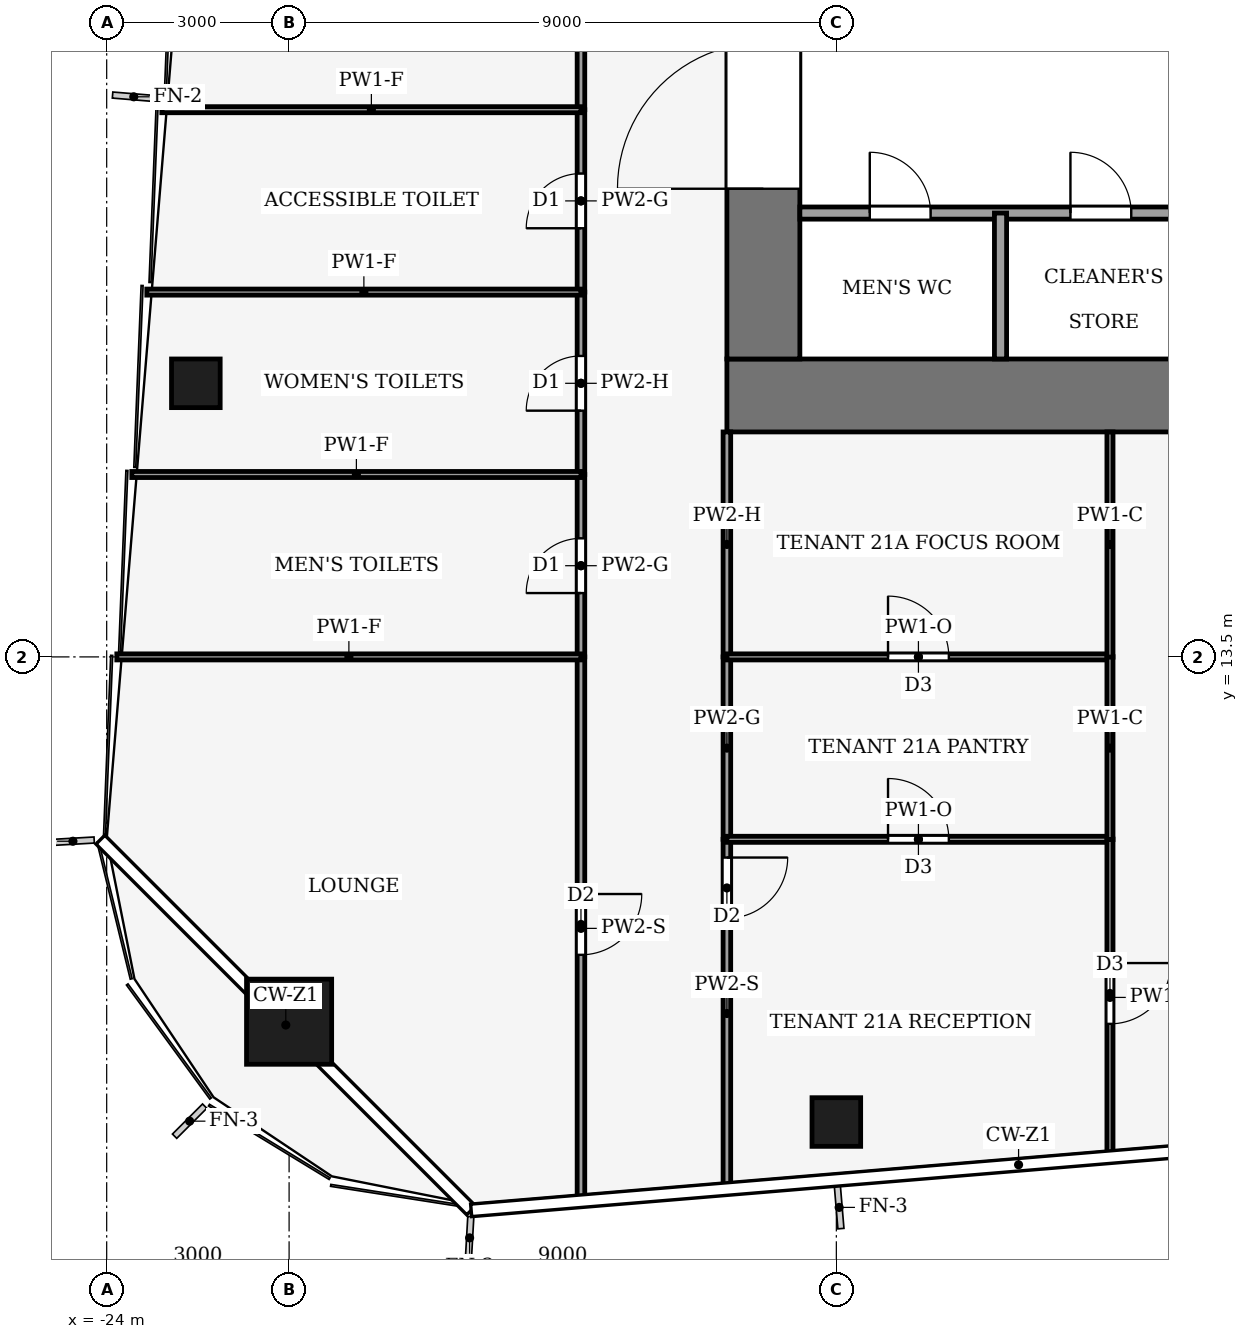
"""IFC4 building model, lengths in metres.
Left out: names, types, materials, properties, quantities, classifications, styles, units other than length and angle.
Written with IfcOpenShell. Run it as: python <this file> out.ifc"""

import sys

from ifc_helpers import new_model, si_unit, direction, frame, frame_2d, origin, origin_2d, place, context, subcontext, project, spatial, rectangle, hollow_rectangle, extrude, element, fill, save


model = new_model("IFC4")
c1 = context("Model", 3, precision=1e-05, world=origin(), true_north=direction((0.0, 1.0)))
c2 = subcontext(c1, "Body", "Model", "MODEL_VIEW")
j1 = project(units=[si_unit("LENGTHUNIT", "METRE"), si_unit("PLANEANGLEUNIT", "RADIAN")], contexts=[c1])
p1 = place(None, origin())
s1 = spatial("IfcSite", under=j1, at=p1, CompositionType="ELEMENT")
p2 = place(p1, origin())
s2 = spatial("IfcBuilding", under=s1, at=p2, CompositionType="ELEMENT")
p3 = place(p2, frame((0.0, 0.0, 94.0)))
s3 = spatial("IfcBuildingStorey", under=s2, at=p3, CompositionType="ELEMENT", Elevation=94.0)
p4 = place(p3, frame((-13.8, 17.8, -0.13), z_axis=(0.0, 0.0, 1.0), x_axis=(1.0, 0.0, 0.0)))
e1 = element("IfcWall", 1, at=p4, inside=s3, PredefinedType="SHEAR", context=c2, shape_type="SweptSolid", body=[
    extrude(rectangle(XDim=27.6, YDim=1.2, at=frame_2d((13.8, 0.0))), origin(), (0.0, 0.0, 1.0), 4.0),
])
p5 = place(p3, frame((-13.2, 18.4, -0.13), z_axis=(0.0, 0.0, 1.0), x_axis=(0.0, 1.0, 0.0)))
e2 = element("IfcWall", 2, at=p5, inside=s3, PredefinedType="SHEAR", context=c2, shape_type="SweptSolid", body=[
    extrude(rectangle(XDim=19.2, YDim=1.2, at=frame_2d((9.6, 0.0))), origin(), (0.0, 0.0, 1.0), 4.0),
])
p6 = place(p5, frame((2.8, 0.0, 0.13)))
e3 = element("IfcOpeningElement", 3, at=p6, cuts=e2, PredefinedType="OPENING", context=c2, shape_type="SweptSolid", body=[
    extrude(rectangle(XDim=2.4, YDim=2.4, at=frame_2d((1.2, 1.2))), frame((0.0, 0.61, 0.0), z_axis=(0.0, -1.0, 0.0), x_axis=(1.0, 0.0, 0.0)), (0.0, 0.0, 1.0), 1.22),
])
p7 = place(p5, frame((13.4, 0.0, 0.13)))
e4 = element("IfcOpeningElement", 4, at=p7, cuts=e2, PredefinedType="OPENING", context=c2, shape_type="SweptSolid", body=[
    extrude(rectangle(XDim=1.4, YDim=2.2, at=frame_2d((0.7, 1.1))), frame((0.0, 0.61, 0.0), z_axis=(0.0, -1.0, 0.0), x_axis=(1.0, 0.0, 0.0)), (0.0, 0.0, 1.0), 1.22),
])
p8 = place(p3, frame((-21.0, 7.5, 0.0), z_axis=(0.0, 0.0, 1.0), x_axis=(1.0, 0.0, 0.0)))
e5 = element("IfcColumn", 5, at=p8, inside=s3, PredefinedType="COLUMN", context=c2, shape_type="SweptSolid", body=[
    extrude(hollow_rectangle(XDim=1.4, YDim=1.4, WallThickness=0.08, at=origin_2d()), origin(), (0.0, 0.0, 1.0), 4.0),
])
for number, where, z_axis, x_axis in (
    (6, (-12.0, 5.85, 0.0), (0.0, 0.0, 1.0), (1.0, 0.0, 0.0)),
    (7, (-22.534, 18.0, 0.0), (0.0, 0.0, 1.0), (1.0, 0.0, 0.0)),
):
    element("IfcColumn", number, at=place(p3, frame(where, z_axis=z_axis, x_axis=x_axis)), inside=s3, PredefinedType="COLUMN", context=c2, shape_type="SweptSolid", body=[
        extrude(hollow_rectangle(XDim=0.8, YDim=0.8, WallThickness=0.04, at=origin_2d()), origin(), (0.0, 0.0, 1.0), 4.0),
    ])
p9 = place(p3, frame((-12.6, 20.8, 0.0), z_axis=(0.0, 0.0, 1.0), x_axis=(1.0, 0.0, 0.0)))
e8 = element("IfcWall", 8, at=p9, inside=s3, PredefinedType="PARTITIONING", context=c2, shape_type="SweptSolid", body=[
    extrude(rectangle(XDim=6.6, YDim=0.2, at=frame_2d((3.3, 0.0))), origin(), (0.0, 0.0, 1.0), 3.87),
])
p10 = place(p9, frame((1.15, 0.0, 0.0)))
e9 = element("IfcOpeningElement", 9, at=p10, cuts=e8, PredefinedType="OPENING", context=c2, shape_type="SweptSolid", body=[
    extrude(rectangle(XDim=1.0, YDim=2.1, at=frame_2d((0.5, 1.05))), frame((0.0, 0.11, 0.0), z_axis=(0.0, -1.0, 0.0), x_axis=(1.0, 0.0, 0.0)), (0.0, 0.0, 1.0), 0.22),
])
p11 = place(p9, frame((4.45, 0.0, 0.0)))
e10 = element("IfcOpeningElement", 10, at=p11, cuts=e8, PredefinedType="OPENING", context=c2, shape_type="SweptSolid", body=[
    extrude(rectangle(XDim=1.0, YDim=2.1, at=frame_2d((0.5, 1.05))), frame((0.0, 0.11, 0.0), z_axis=(0.0, -1.0, 0.0), x_axis=(1.0, 0.0, 0.0)), (0.0, 0.0, 1.0), 0.22),
])
p12 = place(p3, frame((-9.3, 18.4, 0.0), z_axis=(0.0, 0.0, 1.0), x_axis=(0.0, 1.0, 0.0)))
e11 = element("IfcWall", 11, at=p12, inside=s3, PredefinedType="PARTITIONING", context=c2, shape_type="SweptSolid", body=[
    extrude(rectangle(XDim=2.4, YDim=0.2, at=frame_2d((1.2, 0.0))), origin(), (0.0, 0.0, 1.0), 3.87),
])
p13 = place(p3, frame((-16.2, 13.5, 0.0), z_axis=(0.0, 0.0, 1.0), x_axis=(0.0, -1.0, 0.0)))
e12 = element("IfcWall", 12, at=p13, inside=s3, PredefinedType="PARTITIONING", context=c2, shape_type="SweptSolid", body=[
    extrude(rectangle(XDim=8.93, YDim=0.125, at=frame_2d((4.465, 0.0))), origin(), (0.0, 0.0, 1.0), 3.04),
])
p14 = place(p13, frame((3.9, 0.0, 0.0)))
e13 = element("IfcOpeningElement", 13, at=p14, cuts=e12, PredefinedType="OPENING", context=c2, shape_type="SweptSolid", body=[
    extrude(rectangle(XDim=1.0, YDim=2.1, at=frame_2d((0.5, 1.05))), frame((0.0, 0.073, 0.0), z_axis=(0.0, -1.0, 0.0), x_axis=(1.0, 0.0, 0.0)), (0.0, 0.0, 1.0), 0.145),
])
p15 = place(p3, frame((-16.2, 13.5, 0.0), z_axis=(0.0, 0.0, 1.0), x_axis=(0.0, 1.0, 0.0)))
e14 = element("IfcWall", 14, at=p15, inside=s3, PredefinedType="PARTITIONING", context=c2, shape_type="SweptSolid", body=[
    extrude(rectangle(XDim=3.0, YDim=0.125, at=frame_2d((1.5, 0.0))), origin(), (0.0, 0.0, 1.0), 3.87),
])
p16 = place(p15, frame((1.05, 0.0, 0.0)))
e15 = element("IfcOpeningElement", 15, at=p16, cuts=e14, PredefinedType="OPENING", context=c2, shape_type="SweptSolid", body=[
    extrude(rectangle(XDim=0.9, YDim=2.1, at=frame_2d((0.45, 1.05))), frame((0.0, 0.073, 0.0), z_axis=(0.0, -1.0, 0.0), x_axis=(1.0, 0.0, 0.0)), (0.0, 0.0, 1.0), 0.145),
])
p17 = place(p3, frame((-16.2, 16.5, 0.0), z_axis=(0.0, 0.0, 1.0), x_axis=(0.0, 1.0, 0.0)))
e16 = element("IfcWall", 16, at=p17, inside=s3, PredefinedType="PARTITIONING", context=c2, shape_type="SweptSolid", body=[
    extrude(rectangle(XDim=3.0, YDim=0.125, at=frame_2d((1.5, 0.0))), origin(), (0.0, 0.0, 1.0), 3.14),
])
p18 = place(p17, frame((1.05, 0.0, 0.0)))
e17 = element("IfcOpeningElement", 17, at=p18, cuts=e16, PredefinedType="OPENING", context=c2, shape_type="SweptSolid", body=[
    extrude(rectangle(XDim=0.9, YDim=2.1, at=frame_2d((0.45, 1.05))), frame((0.0, 0.073, 0.0), z_axis=(0.0, -1.0, 0.0), x_axis=(1.0, 0.0, 0.0)), (0.0, 0.0, 1.0), 0.145),
])
p19 = place(p3, frame((-16.2, 19.5, 0.0), z_axis=(0.0, 0.0, 1.0), x_axis=(0.0, 1.0, 0.0)))
e18 = element("IfcWall", 18, at=p19, inside=s3, PredefinedType="PARTITIONING", context=c2, shape_type="SweptSolid", body=[
    extrude(rectangle(XDim=3.0, YDim=0.125, at=frame_2d((1.5, 0.0))), origin(), (0.0, 0.0, 1.0), 3.87),
])
p20 = place(p19, frame((1.05, 0.0, 0.0)))
e19 = element("IfcOpeningElement", 19, at=p20, cuts=e18, PredefinedType="OPENING", context=c2, shape_type="SweptSolid", body=[
    extrude(rectangle(XDim=0.9, YDim=2.1, at=frame_2d((0.45, 1.05))), frame((0.0, 0.073, 0.0), z_axis=(0.0, -1.0, 0.0), x_axis=(1.0, 0.0, 0.0)), (0.0, 0.0, 1.0), 0.145),
])
p21 = place(p3, frame((-16.2, 22.5, 0.0), z_axis=(0.0, 0.0, 1.0), x_axis=(0.0, 1.0, 0.0)))
e20 = element("IfcWall", 20, at=p21, inside=s3, PredefinedType="PARTITIONING", context=c2, shape_type="SweptSolid", body=[
    extrude(rectangle(XDim=9.0, YDim=0.125, at=frame_2d((4.5, 0.0))), origin(), (0.0, 0.0, 1.0), 3.48),
])
p22 = place(p21, frame((4.0, 0.0, 0.0)))
e21 = element("IfcOpeningElement", 21, at=p22, cuts=e20, PredefinedType="OPENING", context=c2, shape_type="SweptSolid", body=[
    extrude(rectangle(XDim=1.0, YDim=2.1, at=frame_2d((0.5, 1.05))), frame((0.0, 0.073, 0.0), z_axis=(0.0, -1.0, 0.0), x_axis=(1.0, 0.0, 0.0)), (0.0, 0.0, 1.0), 0.145),
])
p23 = place(p3, frame((-13.8, 10.5, 0.0), z_axis=(0.0, 0.0, 1.0), x_axis=(0.0, -1.0, 0.0)))
e22 = element("IfcWall", 22, at=p23, inside=s3, PredefinedType="PARTITIONING", context=c2, shape_type="SweptSolid", body=[
    extrude(rectangle(XDim=5.73, YDim=0.125, at=frame_2d((2.865, 0.0))), origin(), (0.0, 0.0, 1.0), 3.04),
])
p24 = place(p23, frame((0.3, 0.0, 0.0)))
e23 = element("IfcOpeningElement", 23, at=p24, cuts=e22, PredefinedType="OPENING", context=c2, shape_type="SweptSolid", body=[
    extrude(rectangle(XDim=1.0, YDim=2.1, at=frame_2d((0.5, 1.05))), frame((0.0, 0.073, 0.0), z_axis=(0.0, -1.0, 0.0), x_axis=(1.0, 0.0, 0.0)), (0.0, 0.0, 1.0), 0.145),
])
p25 = place(p3, frame((-13.8, 10.5, 0.0), z_axis=(0.0, 0.0, 1.0), x_axis=(0.0, 1.0, 0.0)))
e24 = element("IfcWall", 24, at=p25, inside=s3, PredefinedType="PARTITIONING", context=c2, shape_type="SweptSolid", body=[
    extrude(rectangle(XDim=3.0, YDim=0.125, at=frame_2d((1.5, 0.0))), origin(), (0.0, 0.0, 1.0), 3.87),
])
p26 = place(p3, frame((-13.8, 13.5, 0.0), z_axis=(0.0, 0.0, 1.0), x_axis=(0.0, 1.0, 0.0)))
e25 = element("IfcWall", 25, at=p26, inside=s3, PredefinedType="PARTITIONING", context=c2, shape_type="SweptSolid", body=[
    extrude(rectangle(XDim=3.7, YDim=0.125, at=frame_2d((1.85, 0.0))), origin(), (0.0, 0.0, 1.0), 3.14),
])
p27 = place(p3, frame((-16.2, 13.5, 0.0), z_axis=(0.0, 0.0, 1.0), x_axis=(-1.0, 0.0, 0.0)))
e26 = element("IfcWall", 26, at=p27, inside=s3, PredefinedType="PARTITIONING", context=c2, shape_type="SweptSolid", body=[
    extrude(rectangle(XDim=7.634, YDim=0.1, at=frame_2d((3.817, 0.0))), origin(), (0.0, 0.0, 1.0), 3.04),
])
p28 = place(p3, frame((-16.2, 16.5, 0.0), z_axis=(0.0, 0.0, 1.0), x_axis=(-1.0, 0.0, 0.0)))
e27 = element("IfcWall", 27, at=p28, inside=s3, PredefinedType="PARTITIONING", context=c2, shape_type="SweptSolid", body=[
    extrude(rectangle(XDim=7.387, YDim=0.1, at=frame_2d((3.693, 0.0))), origin(), (0.0, 0.0, 1.0), 3.04),
])
p29 = place(p3, frame((-16.2, 19.5, 0.0), z_axis=(0.0, 0.0, 1.0), x_axis=(-1.0, 0.0, 0.0)))
e28 = element("IfcWall", 28, at=p29, inside=s3, PredefinedType="PARTITIONING", context=c2, shape_type="SweptSolid", body=[
    extrude(rectangle(XDim=7.14, YDim=0.1, at=frame_2d((3.57, 0.0))), origin(), (0.0, 0.0, 1.0), 3.04),
])
p30 = place(p3, frame((-16.2, 22.5, 0.0), z_axis=(0.0, 0.0, 1.0), x_axis=(-1.0, 0.0, 0.0)))
e29 = element("IfcWall", 29, at=p30, inside=s3, PredefinedType="PARTITIONING", context=c2, shape_type="SweptSolid", body=[
    extrude(rectangle(XDim=6.894, YDim=0.1, at=frame_2d((3.447, 0.0))), origin(), (0.0, 0.0, 1.0), 3.04),
])
p31 = place(p3, frame((-13.8, 10.5, 0.0), z_axis=(0.0, 0.0, 1.0), x_axis=(1.0, 0.0, 0.0)))
e30 = element("IfcWall", 30, at=p31, inside=s3, PredefinedType="PARTITIONING", context=c2, shape_type="SweptSolid", body=[
    extrude(rectangle(XDim=6.3, YDim=0.1, at=frame_2d((3.15, 0.0))), origin(), (0.0, 0.0, 1.0), 3.39),
])
p32 = place(p31, frame((2.65, 0.0, 0.0)))
e31 = element("IfcOpeningElement", 31, at=p32, cuts=e30, PredefinedType="OPENING", context=c2, shape_type="SweptSolid", body=[
    extrude(rectangle(XDim=1.0, YDim=2.1, at=frame_2d((0.5, 1.05))), frame((0.0, 0.06, 0.0), z_axis=(0.0, -1.0, 0.0), x_axis=(1.0, 0.0, 0.0)), (0.0, 0.0, 1.0), 0.12),
])
p33 = place(p3, frame((-7.5, 10.504, 0.0), z_axis=(0.0, 0.0, 1.0), x_axis=(0.0, -1.0, 0.0)))
e32 = element("IfcWall", 32, at=p33, inside=s3, PredefinedType="PARTITIONING", context=c2, shape_type="SweptSolid", body=[
    extrude(rectangle(XDim=5.209, YDim=0.1, at=frame_2d((2.604, 0.0))), origin(), (0.0, 0.0, 1.0), 3.04),
])
p34 = place(p33, frame((2.039, 0.0, 0.0)))
e33 = element("IfcOpeningElement", 33, at=p34, cuts=e32, PredefinedType="OPENING", context=c2, shape_type="SweptSolid", body=[
    extrude(rectangle(XDim=1.0, YDim=2.1, at=frame_2d((0.5, 1.05))), frame((0.0, 0.06, 0.0), z_axis=(0.0, -1.0, 0.0), x_axis=(1.0, 0.0, 0.0)), (0.0, 0.0, 1.0), 0.12),
])
p35 = place(p3, frame((-13.8, 13.5, 0.0), z_axis=(0.0, 0.0, 1.0), x_axis=(1.0, 0.0, 0.0)))
e34 = element("IfcWall", 34, at=p35, inside=s3, PredefinedType="PARTITIONING", context=c2, shape_type="SweptSolid", body=[
    extrude(rectangle(XDim=6.3, YDim=0.1, at=frame_2d((3.15, 0.0))), origin(), (0.0, 0.0, 1.0), 3.39),
])
p36 = place(p35, frame((2.65, 0.0, 0.0)))
e35 = element("IfcOpeningElement", 35, at=p36, cuts=e34, PredefinedType="OPENING", context=c2, shape_type="SweptSolid", body=[
    extrude(rectangle(XDim=1.0, YDim=2.1, at=frame_2d((0.5, 1.05))), frame((0.0, 0.06, 0.0), z_axis=(0.0, -1.0, 0.0), x_axis=(1.0, 0.0, 0.0)), (0.0, 0.0, 1.0), 0.12),
])
p37 = place(p3, frame((-7.5, 10.496, 0.0), z_axis=(0.0, 0.0, 1.0), x_axis=(0.0, 1.0, 0.0)))
e36 = element("IfcWall", 36, at=p37, inside=s3, PredefinedType="PARTITIONING", context=c2, shape_type="SweptSolid", body=[
    extrude(rectangle(XDim=3.008, YDim=0.1, at=frame_2d((1.504, 0.0))), origin(), (0.0, 0.0, 1.0), 3.87),
])
p38 = place(p3, frame((-7.5, 13.496, 0.0), z_axis=(0.0, 0.0, 1.0), x_axis=(0.0, 1.0, 0.0)))
e37 = element("IfcWall", 37, at=p38, inside=s3, PredefinedType="PARTITIONING", context=c2, shape_type="SweptSolid", body=[
    extrude(rectangle(XDim=3.704, YDim=0.1, at=frame_2d((1.852, 0.0))), origin(), (0.0, 0.0, 1.0), 3.87),
])
p39 = place(p10, origin())
e38 = element("IfcDoor", 38, at=p39, inside=s3, OperationType="SINGLE_SWING_LEFT", PredefinedType="DOOR", context=c2, shape_type="SweptSolid", body=[
    extrude(rectangle(XDim=1.0, YDim=2.1, at=frame_2d((0.5, 1.05))), frame((0.0, 0.025, 0.0), z_axis=(0.0, -1.0, 0.0), x_axis=(1.0, 0.0, 0.0)), (0.0, 0.0, 1.0), 0.05),
])
fill(e9, e38)
p40 = place(p11, origin())
e39 = element("IfcDoor", 39, at=p40, inside=s3, OperationType="SINGLE_SWING_LEFT", PredefinedType="DOOR", context=c2, shape_type="SweptSolid", body=[
    extrude(rectangle(XDim=1.0, YDim=2.1, at=frame_2d((0.5, 1.05))), frame((0.0, 0.025, 0.0), z_axis=(0.0, -1.0, 0.0), x_axis=(1.0, 0.0, 0.0)), (0.0, 0.0, 1.0), 0.05),
])
fill(e10, e39)
p41 = place(p6, origin())
e40 = element("IfcDoor", 40, at=p41, inside=s3, OperationType="DOUBLE_DOOR_SINGLE_SWING", PredefinedType="DOOR", context=c2, shape_type="SweptSolid", body=[
    extrude(rectangle(XDim=2.4, YDim=2.4, at=frame_2d((1.2, 1.2))), frame((0.0, 0.025, 0.0), z_axis=(0.0, -1.0, 0.0), x_axis=(1.0, 0.0, 0.0)), (0.0, 0.0, 1.0), 0.05),
])
fill(e3, e40)
p42 = place(p14, origin())
e41 = element("IfcDoor", 41, at=p42, inside=s3, OperationType="SINGLE_SWING_LEFT", PredefinedType="DOOR", context=c2, shape_type="SweptSolid", body=[
    extrude(rectangle(XDim=1.0, YDim=2.1, at=frame_2d((0.5, 1.05))), frame((0.0, 0.025, 0.0), z_axis=(0.0, -1.0, 0.0), x_axis=(1.0, 0.0, 0.0)), (0.0, 0.0, 1.0), 0.05),
])
fill(e13, e41)
p43 = place(p16, origin())
e42 = element("IfcDoor", 42, at=p43, inside=s3, OperationType="SINGLE_SWING_RIGHT", PredefinedType="DOOR", context=c2, shape_type="SweptSolid", body=[
    extrude(rectangle(XDim=0.9, YDim=2.1, at=frame_2d((0.45, 1.05))), frame((0.0, 0.025, 0.0), z_axis=(0.0, -1.0, 0.0), x_axis=(1.0, 0.0, 0.0)), (0.0, 0.0, 1.0), 0.05),
])
fill(e15, e42)
p44 = place(p18, origin())
e43 = element("IfcDoor", 43, at=p44, inside=s3, OperationType="SINGLE_SWING_LEFT", PredefinedType="DOOR", context=c2, shape_type="SweptSolid", body=[
    extrude(rectangle(XDim=0.9, YDim=2.1, at=frame_2d((0.45, 1.05))), frame((0.0, 0.025, 0.0), z_axis=(0.0, -1.0, 0.0), x_axis=(1.0, 0.0, 0.0)), (0.0, 0.0, 1.0), 0.05),
])
fill(e17, e43)
p45 = place(p20, origin())
e44 = element("IfcDoor", 44, at=p45, inside=s3, OperationType="SINGLE_SWING_RIGHT", PredefinedType="DOOR", context=c2, shape_type="SweptSolid", body=[
    extrude(rectangle(XDim=0.9, YDim=2.1, at=frame_2d((0.45, 1.05))), frame((0.0, 0.025, 0.0), z_axis=(0.0, -1.0, 0.0), x_axis=(1.0, 0.0, 0.0)), (0.0, 0.0, 1.0), 0.05),
])
fill(e19, e44)
p46 = place(p24, origin())
e45 = element("IfcDoor", 45, at=p46, inside=s3, OperationType="SINGLE_SWING_LEFT", PredefinedType="DOOR", context=c2, shape_type="SweptSolid", body=[
    extrude(rectangle(XDim=1.0, YDim=2.1, at=frame_2d((0.5, 1.05))), frame((0.0, 0.025, 0.0), z_axis=(0.0, -1.0, 0.0), x_axis=(1.0, 0.0, 0.0)), (0.0, 0.0, 1.0), 0.05),
])
fill(e23, e45)
p47 = place(p32, origin())
e46 = element("IfcDoor", 46, at=p47, inside=s3, OperationType="SINGLE_SWING_LEFT", PredefinedType="DOOR", context=c2, shape_type="SweptSolid", body=[
    extrude(rectangle(XDim=1.0, YDim=2.1, at=frame_2d((0.5, 1.05))), frame((0.0, 0.025, 0.0), z_axis=(0.0, -1.0, 0.0), x_axis=(1.0, 0.0, 0.0)), (0.0, 0.0, 1.0), 0.05),
])
fill(e31, e46)
p48 = place(p34, origin())
e47 = element("IfcDoor", 47, at=p48, inside=s3, OperationType="SINGLE_SWING_LEFT", PredefinedType="DOOR", context=c2, shape_type="SweptSolid", body=[
    extrude(rectangle(XDim=1.0, YDim=2.1, at=frame_2d((0.5, 1.05))), frame((0.0, 0.025, 0.0), z_axis=(0.0, -1.0, 0.0), x_axis=(1.0, 0.0, 0.0)), (0.0, 0.0, 1.0), 0.05),
])
fill(e33, e47)
p49 = place(p36, origin())
e48 = element("IfcDoor", 48, at=p49, inside=s3, OperationType="SINGLE_SWING_LEFT", PredefinedType="DOOR", context=c2, shape_type="SweptSolid", body=[
    extrude(rectangle(XDim=1.0, YDim=2.1, at=frame_2d((0.5, 1.05))), frame((0.0, 0.025, 0.0), z_axis=(0.0, -1.0, 0.0), x_axis=(1.0, 0.0, 0.0)), (0.0, 0.0, 1.0), 0.05),
])
fill(e35, e48)
save(model, sys.argv[1])
